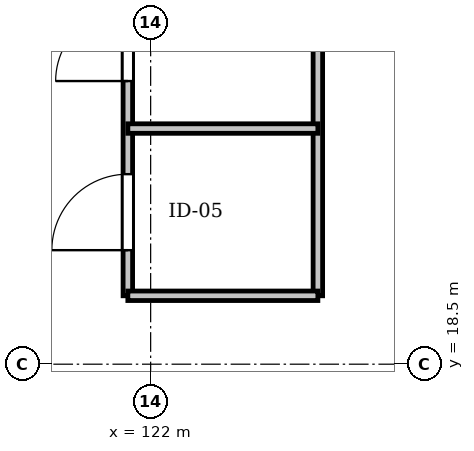
"""IFC4 building model, lengths in metres.
Left out: names, types, materials, properties, quantities, classifications, styles, units other than length and angle.
Written with IfcOpenShell. Run it as: python <this file> out.ifc"""

import sys

from ifc_helpers import new_model, si_unit, direction, frame, frame_2d, origin, place, context, subcontext, project, spatial, rectangle, extrude, element, fill, save


model = new_model("IFC4")
c1 = context("Model", 3, precision=1e-05, world=origin(), true_north=direction((0.0, 1.0)))
c2 = subcontext(c1, "Body", "Model", "MODEL_VIEW")
j1 = project(units=[si_unit("LENGTHUNIT", "METRE"), si_unit("PLANEANGLEUNIT", "RADIAN")], contexts=[c1])
p1 = place(None, origin())
s1 = spatial("IfcSite", under=j1, at=p1, CompositionType="ELEMENT")
p2 = place(p1, origin())
s2 = spatial("IfcBuilding", under=s1, at=p2, CompositionType="ELEMENT")
p3 = place(p2, origin())
s3 = spatial("IfcBuildingStorey", under=s2, at=p3, CompositionType="ELEMENT", Elevation=0.0)
p4 = place(p3, frame((121.7, 19.4, 0.0), z_axis=(0.0, 0.0, 1.0), x_axis=(0.0, 1.0, 0.0)))
e1 = element("IfcWall", 1, at=p4, inside=s3, PredefinedType="PARTITIONING", context=c2, shape_type="SweptSolid", body=[
    extrude(rectangle(XDim=6.6, YDim=0.125, at=frame_2d((3.3, 0.0))), origin(), (0.0, 0.0, 1.0), 5.05),
])
p5 = place(p4, frame((0.6, 0.0, 0.0)))
e2 = element("IfcOpeningElement", 2, at=p5, cuts=e1, PredefinedType="OPENING", context=c2, shape_type="SweptSolid", body=[
    extrude(rectangle(XDim=1.0, YDim=2.2, at=frame_2d((0.5, 1.1))), frame((0.0, 0.073, 0.0), z_axis=(0.0, -1.0, 0.0), x_axis=(1.0, 0.0, 0.0)), (0.0, 0.0, 1.0), 0.145),
])
p6 = place(p4, frame((2.825, 0.0, 0.0)))
e3 = element("IfcOpeningElement", 3, at=p6, cuts=e1, PredefinedType="OPENING", context=c2, shape_type="SweptSolid", body=[
    extrude(rectangle(XDim=0.95, YDim=2.2, at=frame_2d((0.475, 1.1))), frame((0.0, 0.073, 0.0), z_axis=(0.0, -1.0, 0.0), x_axis=(1.0, 0.0, 0.0)), (0.0, 0.0, 1.0), 0.145),
])
p7 = place(p4, frame((5.025, 0.0, 0.0)))
e4 = element("IfcOpeningElement", 4, at=p7, cuts=e1, PredefinedType="OPENING", context=c2, shape_type="SweptSolid", body=[
    extrude(rectangle(XDim=0.95, YDim=2.2, at=frame_2d((0.475, 1.1))), frame((0.0, 0.073, 0.0), z_axis=(0.0, -1.0, 0.0), x_axis=(1.0, 0.0, 0.0)), (0.0, 0.0, 1.0), 0.145),
])
p8 = place(p3, frame((124.2, 19.4, 0.0), z_axis=(0.0, 0.0, 1.0), x_axis=(0.0, 1.0, 0.0)))
e5 = element("IfcWall", 5, at=p8, inside=s3, PredefinedType="PARTITIONING", context=c2, shape_type="SweptSolid", body=[
    extrude(rectangle(XDim=6.6, YDim=0.125, at=frame_2d((3.3, 0.0))), origin(), (0.0, 0.0, 1.0), 5.05),
])
for number, where, z_axis, x_axis in (
    (6, (121.7, 19.4, 0.0), (0.0, 0.0, 1.0), (1.0, 0.0, 0.0)),
    (7, (121.7, 21.6, 0.0), (0.0, 0.0, 1.0), (1.0, 0.0, 0.0)),
):
    element("IfcWall", number, at=place(p3, frame(where, z_axis=z_axis, x_axis=x_axis)), inside=s3, PredefinedType="PARTITIONING", context=c2, shape_type="SweptSolid", body=[
        extrude(rectangle(XDim=2.5, YDim=0.125, at=frame_2d((1.25, 0.0))), origin(), (0.0, 0.0, 1.0), 4.45),
    ])
p9 = place(p5, origin())
e8 = element("IfcDoor", 8, at=p9, inside=s3, OperationType="SINGLE_SWING_RIGHT", PredefinedType="DOOR", context=c2, shape_type="SweptSolid", body=[
    extrude(rectangle(XDim=1.0, YDim=2.2, at=frame_2d((0.5, 1.1))), frame((0.0, 0.025, 0.0), z_axis=(0.0, -1.0, 0.0), x_axis=(1.0, 0.0, 0.0)), (0.0, 0.0, 1.0), 0.05),
])
fill(e2, e8)
p10 = place(p6, origin())
e9 = element("IfcDoor", 9, at=p10, inside=s3, OperationType="SINGLE_SWING_LEFT", PredefinedType="DOOR", context=c2, shape_type="SweptSolid", body=[
    extrude(rectangle(XDim=0.95, YDim=2.2, at=frame_2d((0.475, 1.1))), frame((0.0, 0.025, 0.0), z_axis=(0.0, -1.0, 0.0), x_axis=(1.0, 0.0, 0.0)), (0.0, 0.0, 1.0), 0.05),
])
fill(e3, e9)
save(model, sys.argv[1])
